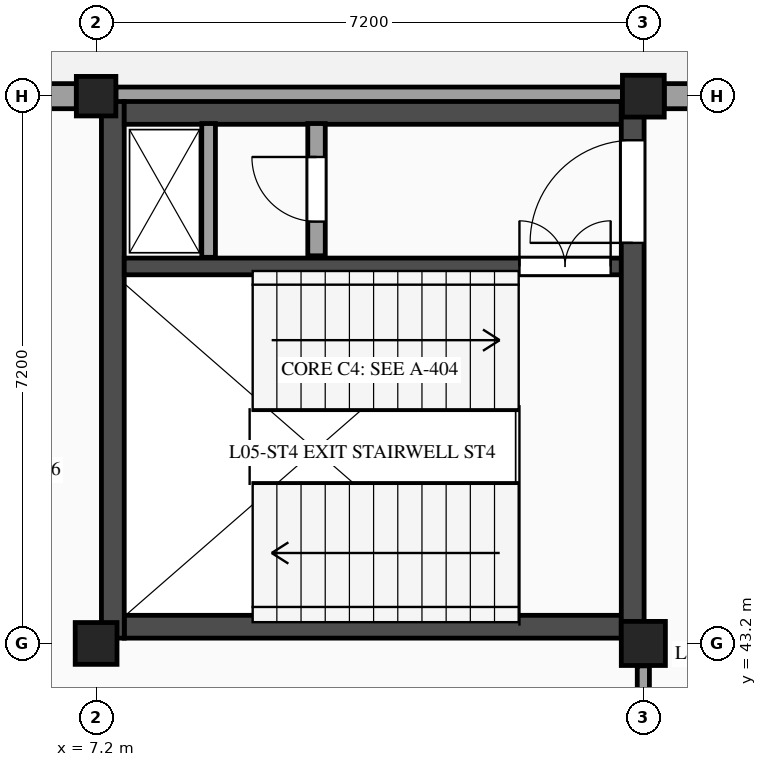
"""IFC4 building model, lengths in metres.
Left out: names, types, materials, properties, quantities, classifications, styles, units other than length and angle.
Written with IfcOpenShell. Run it as: python <this file> out.ifc"""

import sys

from ifc_helpers import new_model, si_unit, direction, frame, frame_2d, origin, origin_2d, place, context, subcontext, project, spatial, rectangle, extrude, element, fill, save


model = new_model("IFC4")
c1 = context("Model", 3, precision=1e-05, world=origin(), true_north=direction((0.0, 1.0)))
c2 = subcontext(c1, "Body", "Model", "MODEL_VIEW")
j1 = project(units=[si_unit("LENGTHUNIT", "METRE"), si_unit("PLANEANGLEUNIT", "RADIAN")], contexts=[c1])
p1 = place(None, origin())
s1 = spatial("IfcSite", under=j1, at=p1, CompositionType="ELEMENT")
p2 = place(p1, origin())
s2 = spatial("IfcBuilding", under=s1, at=p2, CompositionType="ELEMENT")
p3 = place(p2, frame((0.0, 0.0, 22.8)))
s3 = spatial("IfcBuildingStorey", under=s2, at=p3, CompositionType="ELEMENT", Elevation=22.8)
p4 = place(p3, frame((7.2, 43.2, 0.0), z_axis=(0.0, 0.0, 1.0), x_axis=(1.0, 0.0, 0.0)))
e1 = element("IfcColumn", 1, at=p4, inside=s3, PredefinedType="COLUMN", context=c2, shape_type="SweptSolid", body=[
    extrude(rectangle(XDim=0.55, YDim=0.55, at=origin_2d()), origin(), (0.0, 0.0, 1.0), 3.9),
])
p5 = place(p3, frame((7.2, 50.4, 0.0), z_axis=(0.0, 0.0, 1.0), x_axis=(1.0, 0.0, 0.0)))
e2 = element("IfcColumn", 2, at=p5, inside=s3, PredefinedType="COLUMN", context=c2, shape_type="SweptSolid", body=[
    extrude(rectangle(XDim=0.52, YDim=0.52, at=origin_2d()), origin(), (0.0, 0.0, 1.0), 3.9),
])
p6 = place(p3, frame((14.4, 43.2, 0.0), z_axis=(0.0, 0.0, 1.0), x_axis=(1.0, 0.0, 0.0)))
e3 = element("IfcColumn", 3, at=p6, inside=s3, PredefinedType="COLUMN", context=c2, shape_type="SweptSolid", body=[
    extrude(rectangle(XDim=0.58, YDim=0.58, at=origin_2d()), origin(), (0.0, 0.0, 1.0), 3.9),
])
p7 = place(p3, frame((14.4, 50.4, 0.0), z_axis=(0.0, 0.0, 1.0), x_axis=(1.0, 0.0, 0.0)))
e4 = element("IfcColumn", 4, at=p7, inside=s3, PredefinedType="COLUMN", context=c2, shape_type="SweptSolid", body=[
    extrude(rectangle(XDim=0.55, YDim=0.55, at=origin_2d()), origin(), (0.0, 0.0, 1.0), 3.9),
])
p8 = place(p3, frame((0.25, 50.4, 0.0), z_axis=(0.0, 0.0, 1.0), x_axis=(1.0, 0.0, 0.0)))
e5 = element("IfcWall", 5, at=p8, inside=s3, PredefinedType="STANDARD", context=c2, shape_type="SweptSolid", body=[
    extrude(rectangle(XDim=6.69, YDim=0.33, at=frame_2d((3.345, 0.0))), origin(), (0.0, 0.0, 1.0), 2.865),
])
p9 = place(p8, frame((2.645, 0.0, 0.0)))
e6 = element("IfcOpeningElement", 6, at=p9, cuts=e5, PredefinedType="OPENING", context=c2, shape_type="SweptSolid", body=[
    extrude(rectangle(XDim=1.4, YDim=2.25, at=frame_2d((0.7, 1.125))), frame((0.0, 0.175, 0.0), z_axis=(0.0, -1.0, 0.0), x_axis=(1.0, 0.0, 0.0)), (0.0, 0.0, 1.0), 0.35),
])
p10 = place(p3, frame((7.46, 50.4, 0.0), z_axis=(0.0, 0.0, 1.0), x_axis=(1.0, 0.0, 0.0)))
e7 = element("IfcWall", 7, at=p10, inside=s3, PredefinedType="STANDARD", context=c2, shape_type="SweptSolid", body=[
    extrude(rectangle(XDim=6.665, YDim=0.24, at=frame_2d((3.333, 0.0))), origin(), (0.0, 0.0, 1.0), 2.865),
])
p11 = place(p3, frame((14.675, 50.4, 0.0), z_axis=(0.0, 0.0, 1.0), x_axis=(1.0, 0.0, 0.0)))
e8 = element("IfcWall", 8, at=p11, inside=s3, PredefinedType="STANDARD", context=c2, shape_type="SweptSolid", body=[
    extrude(rectangle(XDim=6.635, YDim=0.33, at=frame_2d((3.317, 0.0))), origin(), (0.0, 0.0, 1.0), 2.865),
])
p12 = place(p11, frame((2.768, 0.0, 0.0)))
e9 = element("IfcOpeningElement", 9, at=p12, cuts=e8, PredefinedType="OPENING", context=c2, shape_type="SweptSolid", body=[
    extrude(rectangle(XDim=1.1, YDim=2.2, at=frame_2d((0.55, 1.1))), frame((0.0, 0.175, 0.0), z_axis=(0.0, -1.0, 0.0), x_axis=(1.0, 0.0, 0.0)), (0.0, 0.0, 1.0), 0.35),
])
p13 = place(p3, frame((7.57, 43.42, 0.0), z_axis=(0.0, 0.0, 1.0), x_axis=(1.0, 0.0, 0.0)))
e10 = element("IfcWall", 10, at=p13, inside=s3, PredefinedType="SHEAR", context=c2, shape_type="SweptSolid", body=[
    extrude(rectangle(XDim=6.54, YDim=0.3, at=frame_2d((3.27, 0.0))), origin(), (0.0, 0.0, 1.0), 3.67),
])
p14 = place(p3, frame((7.42, 50.33, 0.0), z_axis=(0.0, 0.0, 1.0), x_axis=(0.0, -1.0, 0.0)))
e11 = element("IfcWall", 11, at=p14, inside=s3, PredefinedType="SHEAR", context=c2, shape_type="SweptSolid", body=[
    extrude(rectangle(XDim=7.06, YDim=0.3, at=frame_2d((3.53, 0.0))), origin(), (0.0, 0.0, 1.0), 3.67),
])
p15 = place(p3, frame((7.57, 50.18, 0.0), z_axis=(0.0, 0.0, 1.0), x_axis=(1.0, 0.0, 0.0)))
e12 = element("IfcWall", 12, at=p15, inside=s3, PredefinedType="SHEAR", context=c2, shape_type="SweptSolid", body=[
    extrude(rectangle(XDim=6.54, YDim=0.3, at=frame_2d((3.27, 0.0))), origin(), (0.0, 0.0, 1.0), 3.67),
])
p16 = place(p3, frame((7.57, 48.16, 0.0), z_axis=(0.0, 0.0, 1.0), x_axis=(1.0, 0.0, 0.0)))
e13 = element("IfcWall", 13, at=p16, inside=s3, PredefinedType="SHEAR", context=c2, shape_type="SweptSolid", body=[
    extrude(rectangle(XDim=6.54, YDim=0.22, at=frame_2d((3.27, 0.0))), origin(), (0.0, 0.0, 1.0), 3.67),
])
p17 = place(p16, frame((5.2, 0.0, 0.0)))
e14 = element("IfcOpeningElement", 14, at=p17, cuts=e13, PredefinedType="OPENING", context=c2, shape_type="SweptSolid", body=[
    extrude(rectangle(XDim=1.2, YDim=2.2, at=frame_2d((0.6, 1.1))), frame((0.0, 0.12, 0.0), z_axis=(0.0, -1.0, 0.0), x_axis=(1.0, 0.0, 0.0)), (0.0, 0.0, 1.0), 0.24),
])
p18 = place(p3, frame((10.1, 48.3, 0.0), z_axis=(0.0, 0.0, 1.0), x_axis=(0.0, 1.0, 0.0)))
e15 = element("IfcWall", 15, at=p18, inside=s3, PredefinedType="PARTITIONING", context=c2, shape_type="SweptSolid", body=[
    extrude(rectangle(XDim=1.74, YDim=0.23, at=frame_2d((0.87, 0.0))), origin(), (0.0, 0.0, 1.0), 3.67),
])
p19 = place(p18, frame((0.45, 0.0, 0.0)))
e16 = element("IfcOpeningElement", 16, at=p19, cuts=e15, PredefinedType="OPENING", context=c2, shape_type="SweptSolid", body=[
    extrude(rectangle(XDim=0.85, YDim=2.1, at=frame_2d((0.425, 1.05))), frame((0.0, 0.125, 0.0), z_axis=(0.0, -1.0, 0.0), x_axis=(1.0, 0.0, 0.0)), (0.0, 0.0, 1.0), 0.25),
])
p20 = place(p3, frame((8.68, 48.28, 0.0), z_axis=(0.0, 0.0, 1.0), x_axis=(0.0, 1.0, 0.0)))
e17 = element("IfcWall", 17, at=p20, inside=s3, PredefinedType="PARTITIONING", context=c2, shape_type="SweptSolid", body=[
    extrude(rectangle(XDim=1.76, YDim=0.18, at=frame_2d((0.88, 0.0))), origin(), (0.0, 0.0, 1.0), 3.67),
])
p21 = place(p3, frame((14.26, 43.27, 0.0), z_axis=(0.0, 0.0, 1.0), x_axis=(0.0, 1.0, 0.0)))
e18 = element("IfcWall", 18, at=p21, inside=s3, PredefinedType="SHEAR", context=c2, shape_type="SweptSolid", body=[
    extrude(rectangle(XDim=7.06, YDim=0.3, at=frame_2d((3.53, 0.0))), origin(), (0.0, 0.0, 1.0), 3.67),
])
p22 = place(p21, frame((5.2, 0.0, 0.0)))
e19 = element("IfcOpeningElement", 19, at=p22, cuts=e18, PredefinedType="OPENING", context=c2, shape_type="SweptSolid", body=[
    extrude(rectangle(XDim=1.35, YDim=2.15, at=frame_2d((0.675, 1.075))), frame((0.0, 0.16, 0.0), z_axis=(0.0, -1.0, 0.0), x_axis=(1.0, 0.0, 0.0)), (0.0, 0.0, 1.0), 0.32),
])
p23 = place(p3, frame((14.4, 36.255, 0.0), z_axis=(0.0, 0.0, 1.0), x_axis=(0.0, 1.0, 0.0)))
e20 = element("IfcWall", 20, at=p23, inside=s3, PredefinedType="PARTITIONING", context=c2, shape_type="SweptSolid", body=[
    extrude(rectangle(XDim=6.65, YDim=0.16, at=frame_2d((3.325, 0.0))), origin(), (0.0, 0.0, 1.0), 2.98),
])
p24 = place(p19, origin())
e21 = element("IfcDoor", 21, at=p24, inside=s3, OperationType="SINGLE_SWING_RIGHT", PredefinedType="DOOR", context=c2, shape_type="SweptSolid", body=[
    extrude(rectangle(XDim=0.85, YDim=2.1, at=frame_2d((0.425, 1.05))), frame((0.0, 0.025, 0.0), z_axis=(0.0, -1.0, 0.0), x_axis=(1.0, 0.0, 0.0)), (0.0, 0.0, 1.0), 0.05),
])
fill(e16, e21)
p25 = place(p17, origin())
e22 = element("IfcDoor", 22, at=p25, inside=s3, OperationType="DOUBLE_DOOR_SINGLE_SWING", PredefinedType="DOOR", context=c2, shape_type="SweptSolid", body=[
    extrude(rectangle(XDim=1.2, YDim=2.2, at=frame_2d((0.6, 1.1))), frame((0.0, 0.025, 0.0), z_axis=(0.0, -1.0, 0.0), x_axis=(1.0, 0.0, 0.0)), (0.0, 0.0, 1.0), 0.05),
])
fill(e14, e22)
p26 = place(p22, origin())
e23 = element("IfcDoor", 23, at=p26, inside=s3, OperationType="SINGLE_SWING_LEFT", PredefinedType="DOOR", context=c2, shape_type="SweptSolid", body=[
    extrude(rectangle(XDim=1.35, YDim=2.15, at=frame_2d((0.675, 1.075))), frame((0.0, 0.025, 0.0), z_axis=(0.0, -1.0, 0.0), x_axis=(1.0, 0.0, 0.0)), (0.0, 0.0, 1.0), 0.05),
])
fill(e19, e23)
save(model, sys.argv[1])
